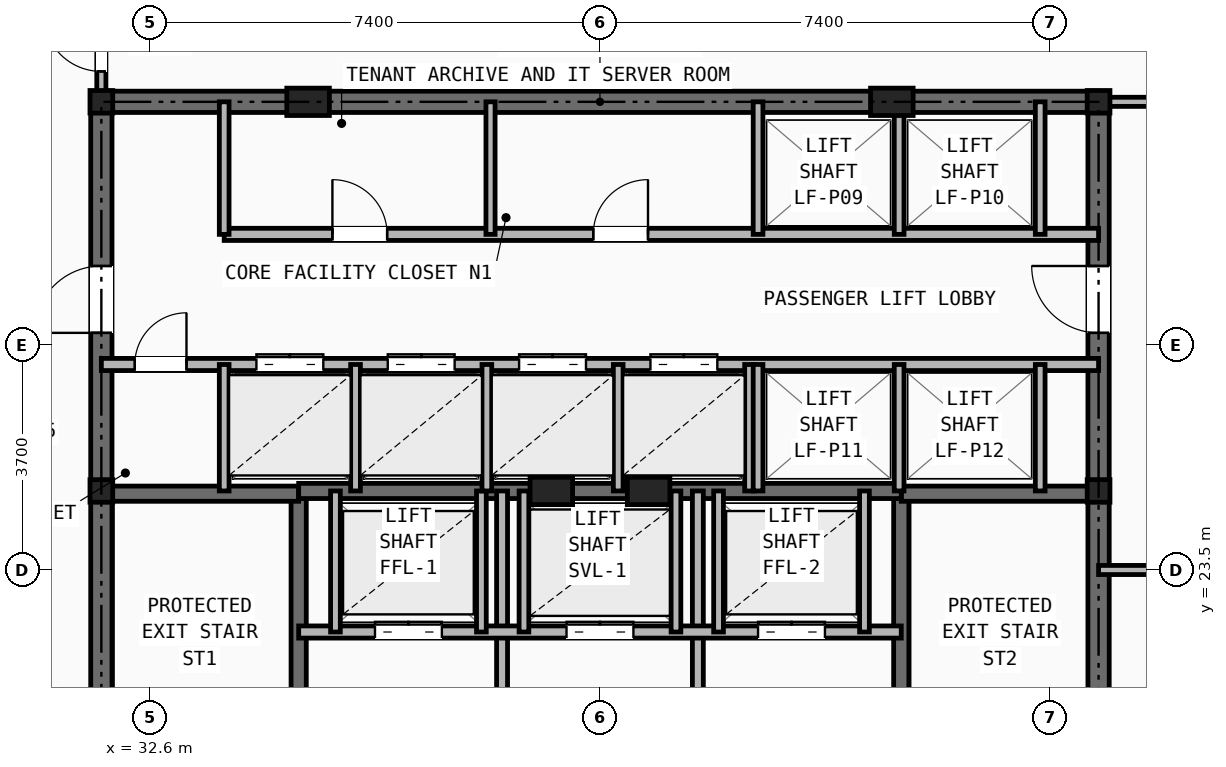
"""IFC4 building model, lengths in metres.
Left out: names, types, materials, properties, quantities, classifications, styles, units other than length and angle.
Written with IfcOpenShell. Run it as: python <this file> out.ifc"""

import sys

from ifc_helpers import new_model, si_unit, direction, frame, frame_2d, origin, origin_2d, place, context, subcontext, project, spatial, rectangle, i_section, extrude, element, fill, save


model = new_model("IFC4")
c1 = context("Model", 3, precision=1e-05, world=origin(), true_north=direction((0.0, 1.0)))
c2 = subcontext(c1, "Body", "Model", "MODEL_VIEW")
j1 = project(units=[si_unit("LENGTHUNIT", "METRE"), si_unit("PLANEANGLEUNIT", "RADIAN")], contexts=[c1])
p1 = place(None, origin())
s1 = spatial("IfcSite", under=j1, at=p1, CompositionType="ELEMENT")
p2 = place(p1, origin())
s2 = spatial("IfcBuilding", under=s1, at=p2, CompositionType="ELEMENT")
p3 = place(p2, frame((0.0, 0.0, 143.6)))
s3 = spatial("IfcBuildingStorey", under=s2, at=p3, CompositionType="ELEMENT", Elevation=143.6)
for number, where, z_axis, x_axis in (
    (1, (31.8, 24.8, 0.0), (0.0, 0.0, 1.0), (1.0, 0.0, 0.0)),
    (2, (48.2, 24.8, 0.0), (0.0, 0.0, 1.0), (1.0, 0.0, 0.0)),
    (3, (31.8, 31.2, 0.0), (0.0, 0.0, 1.0), (1.0, 0.0, 0.0)),
    (4, (48.2, 31.2, 0.0), (0.0, 0.0, 1.0), (1.0, 0.0, 0.0)),
):
    element("IfcColumn", number, at=place(p3, frame(where, z_axis=z_axis, x_axis=x_axis)), inside=s3, PredefinedType="COLUMN", context=c2, shape_type="SweptSolid", body=[
        extrude(i_section(OverallWidth=0.374, OverallDepth=0.372, WebThickness=0.016, FlangeThickness=0.026, at=origin_2d()), origin(), (0.0, 0.0, 1.0), 3.45),
    ])
for number, where, z_axis, x_axis in (
    (5, (35.2, 31.2, 0.0), (0.0, 0.0, 1.0), (1.0, 0.0, 0.0)),
    (6, (44.8, 31.2, 0.0), (0.0, 0.0, 1.0), (1.0, 0.0, 0.0)),
    (7, (39.2, 24.8, 0.0), (0.0, 0.0, 1.0), (1.0, 0.0, 0.0)),
    (8, (40.8, 24.8, 0.0), (0.0, 0.0, 1.0), (1.0, 0.0, 0.0)),
):
    element("IfcColumn", number, at=place(p3, frame(where, z_axis=z_axis, x_axis=x_axis)), inside=s3, PredefinedType="PILASTER", context=c2, shape_type="SweptSolid", body=[
        extrude(rectangle(XDim=0.7, YDim=0.45, at=origin_2d()), origin(), (0.0, 0.0, 1.0), 3.45),
    ])
p4 = place(p3, frame((31.8, 31.2, 0.0), z_axis=(0.0, 0.0, 1.0), x_axis=(1.0, 0.0, 0.0)))
e9 = element("IfcWall", 9, at=p4, inside=s3, PredefinedType="SHEAR", context=c2, shape_type="SweptSolid", body=[
    extrude(rectangle(XDim=16.4, YDim=0.35, at=frame_2d((8.2, 0.0))), origin(), (0.0, 0.0, 1.0), 3.21),
])
p5 = place(p3, frame((31.8, 16.4, 0.0), z_axis=(0.0, 0.0, 1.0), x_axis=(0.0, 1.0, 0.0)))
e10 = element("IfcWall", 10, at=p5, inside=s3, PredefinedType="SHEAR", context=c2, shape_type="SweptSolid", body=[
    extrude(rectangle(XDim=14.8, YDim=0.35, at=frame_2d((7.4, 0.0))), origin(), (0.0, 0.0, 1.0), 3.21),
])
p6 = place(p5, frame((11.0, 0.0, 0.0)))
e11 = element("IfcOpeningElement", 11, at=p6, cuts=e10, PredefinedType="OPENING", context=c2, shape_type="SweptSolid", body=[
    extrude(rectangle(XDim=1.1, YDim=2.15, at=frame_2d((0.55, 1.075))), frame((0.0, 0.185, 0.0), z_axis=(0.0, -1.0, 0.0), x_axis=(1.0, 0.0, 0.0)), (0.0, 0.0, 1.0), 0.37),
])
p7 = place(p3, frame((48.2, 16.4, 0.0), z_axis=(0.0, 0.0, 1.0), x_axis=(0.0, 1.0, 0.0)))
e12 = element("IfcWall", 12, at=p7, inside=s3, PredefinedType="SHEAR", context=c2, shape_type="SweptSolid", body=[
    extrude(rectangle(XDim=14.8, YDim=0.35, at=frame_2d((7.4, 0.0))), origin(), (0.0, 0.0, 1.0), 3.21),
])
p8 = place(p7, frame((11.0, 0.0, 0.0)))
e13 = element("IfcOpeningElement", 13, at=p8, cuts=e12, PredefinedType="OPENING", context=c2, shape_type="SweptSolid", body=[
    extrude(rectangle(XDim=1.1, YDim=2.15, at=frame_2d((0.55, 1.075))), frame((0.0, 0.185, 0.0), z_axis=(0.0, -1.0, 0.0), x_axis=(1.0, 0.0, 0.0)), (0.0, 0.0, 1.0), 0.37),
])
p9 = place(p3, frame((35.045, 16.4, 0.0), z_axis=(0.0, 0.0, 1.0), x_axis=(0.0, 1.0, 0.0)))
e14 = element("IfcWall", 14, at=p9, inside=s3, PredefinedType="SHEAR", context=c2, shape_type="SweptSolid", body=[
    extrude(rectangle(XDim=8.4, YDim=0.25, at=frame_2d((4.2, 0.0))), origin(), (0.0, 0.0, 1.0), 3.21),
])
p10 = place(p9, frame((0.45, 0.0, 0.0)))
e15 = element("IfcOpeningElement", 15, at=p10, cuts=e14, PredefinedType="OPENING", context=c2, shape_type="SweptSolid", body=[
    extrude(rectangle(XDim=0.95, YDim=2.1, at=frame_2d((0.475, 1.05))), frame((0.0, 0.135, 0.0), z_axis=(0.0, -1.0, 0.0), x_axis=(1.0, 0.0, 0.0)), (0.0, 0.0, 1.0), 0.27),
])
p11 = place(p3, frame((31.8, 24.755, 0.0), z_axis=(0.0, 0.0, 1.0), x_axis=(1.0, 0.0, 0.0)))
e16 = element("IfcWall", 16, at=p11, inside=s3, PredefinedType="SHEAR", context=c2, shape_type="SweptSolid", body=[
    extrude(rectangle(XDim=3.245, YDim=0.25, at=frame_2d((1.623, 0.0))), origin(), (0.0, 0.0, 1.0), 3.21),
])
p12 = place(p3, frame((44.955, 16.4, 0.0), z_axis=(0.0, 0.0, 1.0), x_axis=(0.0, 1.0, 0.0)))
e17 = element("IfcWall", 17, at=p12, inside=s3, PredefinedType="SHEAR", context=c2, shape_type="SweptSolid", body=[
    extrude(rectangle(XDim=8.4, YDim=0.25, at=frame_2d((4.2, 0.0))), origin(), (0.0, 0.0, 1.0), 3.21),
])
p13 = place(p12, frame((0.45, 0.0, 0.0)))
e18 = element("IfcOpeningElement", 18, at=p13, cuts=e17, PredefinedType="OPENING", context=c2, shape_type="SweptSolid", body=[
    extrude(rectangle(XDim=0.95, YDim=2.1, at=frame_2d((0.475, 1.05))), frame((0.0, 0.135, 0.0), z_axis=(0.0, -1.0, 0.0), x_axis=(1.0, 0.0, 0.0)), (0.0, 0.0, 1.0), 0.27),
])
p14 = place(p3, frame((44.955, 24.755, 0.0), z_axis=(0.0, 0.0, 1.0), x_axis=(1.0, 0.0, 0.0)))
e19 = element("IfcWall", 19, at=p14, inside=s3, PredefinedType="SHEAR", context=c2, shape_type="SweptSolid", body=[
    extrude(rectangle(XDim=3.245, YDim=0.25, at=frame_2d((1.623, 0.0))), origin(), (0.0, 0.0, 1.0), 3.21),
])
p15 = place(p3, frame((35.045, 24.8, 0.0), z_axis=(0.0, 0.0, 1.0), x_axis=(1.0, 0.0, 0.0)))
e20 = element("IfcWall", 20, at=p15, inside=s3, PredefinedType="SHEAR", context=c2, shape_type="SweptSolid", body=[
    extrude(rectangle(XDim=9.91, YDim=0.25, at=frame_2d((4.955, 0.0))), origin(), (0.0, 0.0, 1.0), 3.21),
])
p16 = place(p3, frame((38.39, 16.4, 0.0), z_axis=(0.0, 0.0, 1.0), x_axis=(0.0, 1.0, 0.0)))
e21 = element("IfcWall", 21, at=p16, inside=s3, PredefinedType="PARTITIONING", context=c2, shape_type="SweptSolid", body=[
    extrude(rectangle(XDim=8.4, YDim=0.18, at=frame_2d((4.2, 0.0))), origin(), (0.0, 0.0, 1.0), 2.661),
])
p17 = place(p16, frame((3.85, 0.0, 0.0)))
e22 = element("IfcOpeningElement", 22, at=p17, cuts=e21, PredefinedType="OPENING", context=c2, shape_type="SweptSolid", body=[
    extrude(rectangle(XDim=0.95, YDim=2.1, at=frame_2d((0.475, 1.05))), frame((0.0, 0.1, 0.0), z_axis=(0.0, -1.0, 0.0), x_axis=(1.0, 0.0, 0.0)), (0.0, 0.0, 1.0), 0.2),
])
p18 = place(p3, frame((41.61, 16.4, 0.0), z_axis=(0.0, 0.0, 1.0), x_axis=(0.0, 1.0, 0.0)))
e23 = element("IfcWall", 23, at=p18, inside=s3, PredefinedType="PARTITIONING", context=c2, shape_type="SweptSolid", body=[
    extrude(rectangle(XDim=8.4, YDim=0.18, at=frame_2d((4.2, 0.0))), origin(), (0.0, 0.0, 1.0), 2.661),
])
p19 = place(p3, frame((35.045, 22.48, 0.0), z_axis=(0.0, 0.0, 1.0), x_axis=(1.0, 0.0, 0.0)))
e24 = element("IfcWall", 24, at=p19, inside=s3, PredefinedType="SOLIDWALL", context=c2, shape_type="SweptSolid", body=[
    extrude(rectangle(XDim=9.91, YDim=0.2, at=frame_2d((4.955, 0.0))), origin(), (0.0, 0.0, 1.0), 3.21),
])
p20 = place(p19, frame((1.255, 0.0, 0.0)))
e25 = element("IfcOpeningElement", 25, at=p20, cuts=e24, PredefinedType="OPENING", context=c2, shape_type="SweptSolid", body=[
    extrude(rectangle(XDim=1.1, YDim=2.15, at=frame_2d((0.55, 1.075))), frame((0.0, 0.11, 0.0), z_axis=(0.0, -1.0, 0.0), x_axis=(1.0, 0.0, 0.0)), (0.0, 0.0, 1.0), 0.22),
])
p21 = place(p19, frame((7.555, 0.0, 0.0)))
e26 = element("IfcOpeningElement", 26, at=p21, cuts=e24, PredefinedType="OPENING", context=c2, shape_type="SweptSolid", body=[
    extrude(rectangle(XDim=1.1, YDim=2.15, at=frame_2d((0.55, 1.075))), frame((0.0, 0.11, 0.0), z_axis=(0.0, -1.0, 0.0), x_axis=(1.0, 0.0, 0.0)), (0.0, 0.0, 1.0), 0.22),
])
p22 = place(p19, frame((4.405, 0.0, 0.0)))
e27 = element("IfcOpeningElement", 27, at=p22, cuts=e24, PredefinedType="OPENING", context=c2, shape_type="SweptSolid", body=[
    extrude(rectangle(XDim=1.1, YDim=2.15, at=frame_2d((0.55, 1.075))), frame((0.0, 0.11, 0.0), z_axis=(0.0, -1.0, 0.0), x_axis=(1.0, 0.0, 0.0)), (0.0, 0.0, 1.0), 0.22),
])
for number, where, z_axis, x_axis in (
    (28, (35.65, 22.48, 0.0), (0.0, 0.0, 1.0), (0.0, 1.0, 0.0)),
    (29, (38.05, 22.48, 0.0), (0.0, 0.0, 1.0), (0.0, 1.0, 0.0)),
    (30, (41.95, 22.48, 0.0), (0.0, 0.0, 1.0), (0.0, 1.0, 0.0)),
    (31, (44.35, 22.48, 0.0), (0.0, 0.0, 1.0), (0.0, 1.0, 0.0)),
    (32, (38.75, 22.48, 0.0), (0.0, 0.0, 1.0), (0.0, 1.0, 0.0)),
    (33, (41.25, 22.48, 0.0), (0.0, 0.0, 1.0), (0.0, 1.0, 0.0)),
):
    element("IfcWall", number, at=place(p3, frame(where, z_axis=z_axis, x_axis=x_axis)), inside=s3, PredefinedType="SOLIDWALL", context=c2, shape_type="SweptSolid", body=[
        extrude(rectangle(XDim=2.32, YDim=0.16, at=frame_2d((1.16, 0.0))), origin(), (0.0, 0.0, 1.0), 3.21),
    ])
p23 = place(p3, frame((33.82, 29.02, 0.0), z_axis=(0.0, 0.0, 1.0), x_axis=(1.0, 0.0, 0.0)))
e34 = element("IfcWall", 34, at=p23, inside=s3, PredefinedType="SOLIDWALL", context=c2, shape_type="SweptSolid", body=[
    extrude(rectangle(XDim=14.38, YDim=0.2, at=frame_2d((7.19, 0.0))), origin(), (0.0, 0.0, 1.0), 2.661),
])
p24 = place(p23, frame((1.78, 0.0, 0.0)))
e35 = element("IfcOpeningElement", 35, at=p24, cuts=e34, PredefinedType="OPENING", context=c2, shape_type="SweptSolid", body=[
    extrude(rectangle(XDim=0.9, YDim=2.1, at=frame_2d((0.45, 1.05))), frame((0.0, 0.11, 0.0), z_axis=(0.0, -1.0, 0.0), x_axis=(1.0, 0.0, 0.0)), (0.0, 0.0, 1.0), 0.22),
])
p25 = place(p23, frame((6.07, 0.0, 0.0)))
e36 = element("IfcOpeningElement", 36, at=p25, cuts=e34, PredefinedType="OPENING", context=c2, shape_type="SweptSolid", body=[
    extrude(rectangle(XDim=0.9, YDim=2.1, at=frame_2d((0.45, 1.05))), frame((0.0, 0.11, 0.0), z_axis=(0.0, -1.0, 0.0), x_axis=(1.0, 0.0, 0.0)), (0.0, 0.0, 1.0), 0.22),
])
p26 = place(p3, frame((31.8, 26.88, 0.0), z_axis=(0.0, 0.0, 1.0), x_axis=(1.0, 0.0, 0.0)))
e37 = element("IfcWall", 37, at=p26, inside=s3, PredefinedType="SOLIDWALL", context=c2, shape_type="SweptSolid", body=[
    extrude(rectangle(XDim=16.4, YDim=0.2, at=frame_2d((8.2, 0.0))), origin(), (0.0, 0.0, 1.0), 2.661),
])
p27 = place(p26, frame((0.55, 0.0, 0.0)))
e38 = element("IfcOpeningElement", 38, at=p27, cuts=e37, PredefinedType="OPENING", context=c2, shape_type="SweptSolid", body=[
    extrude(rectangle(XDim=0.85, YDim=2.05, at=frame_2d((0.425, 1.025))), frame((0.0, 0.11, 0.0), z_axis=(0.0, -1.0, 0.0), x_axis=(1.0, 0.0, 0.0)), (0.0, 0.0, 1.0), 0.22),
])
p28 = place(p26, frame((2.55, 0.0, 0.0)))
e39 = element("IfcOpeningElement", 39, at=p28, cuts=e37, PredefinedType="OPENING", context=c2, shape_type="SweptSolid", body=[
    extrude(rectangle(XDim=1.1, YDim=2.15, at=frame_2d((0.55, 1.075))), frame((0.0, 0.11, 0.0), z_axis=(0.0, -1.0, 0.0), x_axis=(1.0, 0.0, 0.0)), (0.0, 0.0, 1.0), 0.22),
])
p29 = place(p26, frame((4.71, 0.0, 0.0)))
e40 = element("IfcOpeningElement", 40, at=p29, cuts=e37, PredefinedType="OPENING", context=c2, shape_type="SweptSolid", body=[
    extrude(rectangle(XDim=1.1, YDim=2.15, at=frame_2d((0.55, 1.075))), frame((0.0, 0.11, 0.0), z_axis=(0.0, -1.0, 0.0), x_axis=(1.0, 0.0, 0.0)), (0.0, 0.0, 1.0), 0.22),
])
p30 = place(p26, frame((6.87, 0.0, 0.0)))
e41 = element("IfcOpeningElement", 41, at=p30, cuts=e37, PredefinedType="OPENING", context=c2, shape_type="SweptSolid", body=[
    extrude(rectangle(XDim=1.1, YDim=2.15, at=frame_2d((0.55, 1.075))), frame((0.0, 0.11, 0.0), z_axis=(0.0, -1.0, 0.0), x_axis=(1.0, 0.0, 0.0)), (0.0, 0.0, 1.0), 0.22),
])
p31 = place(p26, frame((9.03, 0.0, 0.0)))
e42 = element("IfcOpeningElement", 42, at=p31, cuts=e37, PredefinedType="OPENING", context=c2, shape_type="SweptSolid", body=[
    extrude(rectangle(XDim=1.1, YDim=2.15, at=frame_2d((0.55, 1.075))), frame((0.0, 0.11, 0.0), z_axis=(0.0, -1.0, 0.0), x_axis=(1.0, 0.0, 0.0)), (0.0, 0.0, 1.0), 0.22),
])
p32 = place(p3, frame((33.82, 29.02, 0.0), z_axis=(0.0, 0.0, 1.0), x_axis=(0.0, 1.0, 0.0)))
e43 = element("IfcWall", 43, at=p32, inside=s3, PredefinedType="SOLIDWALL", context=c2, shape_type="SweptSolid", body=[
    extrude(rectangle(XDim=2.18, YDim=0.16, at=frame_2d((1.09, 0.0))), origin(), (0.0, 0.0, 1.0), 2.661),
])
p33 = place(p3, frame((33.82, 24.8, 0.0), z_axis=(0.0, 0.0, 1.0), x_axis=(0.0, 1.0, 0.0)))
e44 = element("IfcWall", 44, at=p33, inside=s3, PredefinedType="SOLIDWALL", context=c2, shape_type="SweptSolid", body=[
    extrude(rectangle(XDim=2.08, YDim=0.16, at=frame_2d((1.04, 0.0))), origin(), (0.0, 0.0, 1.0), 3.21),
])
p34 = place(p3, frame((38.2, 29.02, 0.0), z_axis=(0.0, 0.0, 1.0), x_axis=(0.0, 1.0, 0.0)))
e45 = element("IfcWall", 45, at=p34, inside=s3, PredefinedType="PARTITIONING", context=c2, shape_type="SweptSolid", body=[
    extrude(rectangle(XDim=2.18, YDim=0.15, at=frame_2d((1.09, 0.0))), origin(), (0.0, 0.0, 1.0), 2.661),
])
for number, where, z_axis, x_axis in (
    (46, (35.98, 24.8, 0.0), (0.0, 0.0, 1.0), (0.0, 1.0, 0.0)),
    (47, (38.14, 24.8, 0.0), (0.0, 0.0, 1.0), (0.0, 1.0, 0.0)),
    (48, (40.3, 24.8, 0.0), (0.0, 0.0, 1.0), (0.0, 1.0, 0.0)),
    (49, (42.46, 24.8, 0.0), (0.0, 0.0, 1.0), (0.0, 1.0, 0.0)),
):
    element("IfcWall", number, at=place(p3, frame(where, z_axis=z_axis, x_axis=x_axis)), inside=s3, PredefinedType="SOLIDWALL", context=c2, shape_type="SweptSolid", body=[
        extrude(rectangle(XDim=2.08, YDim=0.16, at=frame_2d((1.04, 0.0))), origin(), (0.0, 0.0, 1.0), 3.21),
    ])
for number, where, z_axis, x_axis in (
    (50, (42.6, 29.02, 0.0), (0.0, 0.0, 1.0), (0.0, 1.0, 0.0)),
    (51, (44.92, 29.02, 0.0), (0.0, 0.0, 1.0), (0.0, 1.0, 0.0)),
    (52, (47.24, 29.02, 0.0), (0.0, 0.0, 1.0), (0.0, 1.0, 0.0)),
):
    element("IfcWall", number, at=place(p3, frame(where, z_axis=z_axis, x_axis=x_axis)), inside=s3, PredefinedType="SOLIDWALL", context=c2, shape_type="SweptSolid", body=[
        extrude(rectangle(XDim=2.18, YDim=0.16, at=frame_2d((1.09, 0.0))), origin(), (0.0, 0.0, 1.0), 2.661),
    ])
for number, where, z_axis, x_axis in (
    (53, (42.6, 24.8, 0.0), (0.0, 0.0, 1.0), (0.0, 1.0, 0.0)),
    (54, (44.92, 24.8, 0.0), (0.0, 0.0, 1.0), (0.0, 1.0, 0.0)),
    (55, (47.24, 24.8, 0.0), (0.0, 0.0, 1.0), (0.0, 1.0, 0.0)),
):
    element("IfcWall", number, at=place(p3, frame(where, z_axis=z_axis, x_axis=x_axis)), inside=s3, PredefinedType="SOLIDWALL", context=c2, shape_type="SweptSolid", body=[
        extrude(rectangle(XDim=2.08, YDim=0.16, at=frame_2d((1.04, 0.0))), origin(), (0.0, 0.0, 1.0), 3.21),
    ])
p35 = place(p3, frame((31.8, 31.2, 0.0), z_axis=(0.0, 0.0, 1.0), x_axis=(0.0, 1.0, 0.0)))
e56 = element("IfcWall", 56, at=p35, inside=s3, PredefinedType="PARTITIONING", context=c2, shape_type="SweptSolid", body=[
    extrude(rectangle(XDim=5.3, YDim=0.15, at=frame_2d((2.65, 0.0))), origin(), (0.0, 0.0, 1.0), 2.252),
])
p36 = place(p35, frame((0.5, 0.0, 0.0)))
e57 = element("IfcOpeningElement", 57, at=p36, cuts=e56, PredefinedType="OPENING", context=c2, shape_type="SweptSolid", body=[
    extrude(rectangle(XDim=0.95, YDim=2.1, at=frame_2d((0.475, 1.05))), frame((0.0, 0.085, 0.0), z_axis=(0.0, -1.0, 0.0), x_axis=(1.0, 0.0, 0.0)), (0.0, 0.0, 1.0), 0.17),
])
p37 = place(p3, frame((48.2, 31.2, 0.0), z_axis=(0.0, 0.0, 1.0), x_axis=(1.0, 0.0, 0.0)))
e58 = element("IfcWall", 58, at=p37, inside=s3, PredefinedType="PARTITIONING", context=c2, shape_type="SweptSolid", body=[
    extrude(rectangle(XDim=8.332, YDim=0.15, at=frame_2d((4.166, 0.0))), origin(), (0.0, 0.0, 1.0), 2.252),
])
p38 = place(p3, frame((48.2, 23.5, 0.0), z_axis=(0.0, 0.0, 1.0), x_axis=(1.0, 0.0, 0.0)))
e59 = element("IfcWall", 59, at=p38, inside=s3, PredefinedType="PARTITIONING", context=c2, shape_type="SweptSolid", body=[
    extrude(rectangle(XDim=12.933, YDim=0.15, at=frame_2d((6.467, 0.0))), origin(), (0.0, 0.0, 1.0), 2.589),
])
p39 = place(p38, frame((1.4, 0.0, 0.0)))
e60 = element("IfcOpeningElement", 60, at=p39, cuts=e59, PredefinedType="OPENING", context=c2, shape_type="SweptSolid", body=[
    extrude(rectangle(XDim=0.95, YDim=2.1, at=frame_2d((0.475, 1.05))), frame((0.0, 0.085, 0.0), z_axis=(0.0, -1.0, 0.0), x_axis=(1.0, 0.0, 0.0)), (0.0, 0.0, 1.0), 0.17),
])
p40 = place(p20, origin())
e61 = element("IfcDoor", 61, at=p40, inside=s3, OperationType="DOUBLE_DOOR_SLIDING", PredefinedType="DOOR", context=c2, shape_type="SweptSolid", body=[
    extrude(rectangle(XDim=1.1, YDim=2.15, at=frame_2d((0.55, 1.075))), frame((0.0, 0.025, 0.0), z_axis=(0.0, -1.0, 0.0), x_axis=(1.0, 0.0, 0.0)), (0.0, 0.0, 1.0), 0.05),
])
fill(e25, e61)
p41 = place(p21, origin())
e62 = element("IfcDoor", 62, at=p41, inside=s3, OperationType="DOUBLE_DOOR_SLIDING", PredefinedType="DOOR", context=c2, shape_type="SweptSolid", body=[
    extrude(rectangle(XDim=1.1, YDim=2.15, at=frame_2d((0.55, 1.075))), frame((0.0, 0.025, 0.0), z_axis=(0.0, -1.0, 0.0), x_axis=(1.0, 0.0, 0.0)), (0.0, 0.0, 1.0), 0.05),
])
fill(e26, e62)
p42 = place(p22, origin())
e63 = element("IfcDoor", 63, at=p42, inside=s3, OperationType="DOUBLE_DOOR_SLIDING", PredefinedType="DOOR", context=c2, shape_type="SweptSolid", body=[
    extrude(rectangle(XDim=1.1, YDim=2.15, at=frame_2d((0.55, 1.075))), frame((0.0, 0.025, 0.0), z_axis=(0.0, -1.0, 0.0), x_axis=(1.0, 0.0, 0.0)), (0.0, 0.0, 1.0), 0.05),
])
fill(e27, e63)
p43 = place(p27, origin())
e64 = element("IfcDoor", 64, at=p43, inside=s3, OperationType="SINGLE_SWING_RIGHT", PredefinedType="DOOR", context=c2, shape_type="SweptSolid", body=[
    extrude(rectangle(XDim=0.85, YDim=2.05, at=frame_2d((0.425, 1.025))), frame((0.0, 0.025, 0.0), z_axis=(0.0, -1.0, 0.0), x_axis=(1.0, 0.0, 0.0)), (0.0, 0.0, 1.0), 0.05),
])
fill(e38, e64)
p44 = place(p6, origin())
e65 = element("IfcDoor", 65, at=p44, inside=s3, OperationType="SINGLE_SWING_LEFT", PredefinedType="DOOR", context=c2, shape_type="SweptSolid", body=[
    extrude(rectangle(XDim=1.1, YDim=2.15, at=frame_2d((0.55, 1.075))), frame((0.0, 0.025, 0.0), z_axis=(0.0, -1.0, 0.0), x_axis=(1.0, 0.0, 0.0)), (0.0, 0.0, 1.0), 0.05),
])
fill(e11, e65)
p45 = place(p8, origin())
e66 = element("IfcDoor", 66, at=p45, inside=s3, OperationType="SINGLE_SWING_RIGHT", PredefinedType="DOOR", context=c2, shape_type="SweptSolid", body=[
    extrude(rectangle(XDim=1.1, YDim=2.15, at=frame_2d((0.55, 1.075))), frame((0.0, 0.025, 0.0), z_axis=(0.0, -1.0, 0.0), x_axis=(1.0, 0.0, 0.0)), (0.0, 0.0, 1.0), 0.05),
])
fill(e13, e66)
p46 = place(p24, origin())
e67 = element("IfcDoor", 67, at=p46, inside=s3, OperationType="SINGLE_SWING_LEFT", PredefinedType="DOOR", context=c2, shape_type="SweptSolid", body=[
    extrude(rectangle(XDim=0.9, YDim=2.1, at=frame_2d((0.45, 1.05))), frame((0.0, 0.025, 0.0), z_axis=(0.0, -1.0, 0.0), x_axis=(1.0, 0.0, 0.0)), (0.0, 0.0, 1.0), 0.05),
])
fill(e35, e67)
p47 = place(p25, origin())
e68 = element("IfcDoor", 68, at=p47, inside=s3, OperationType="SINGLE_SWING_RIGHT", PredefinedType="DOOR", context=c2, shape_type="SweptSolid", body=[
    extrude(rectangle(XDim=0.9, YDim=2.1, at=frame_2d((0.45, 1.05))), frame((0.0, 0.025, 0.0), z_axis=(0.0, -1.0, 0.0), x_axis=(1.0, 0.0, 0.0)), (0.0, 0.0, 1.0), 0.05),
])
fill(e36, e68)
p48 = place(p28, origin())
e69 = element("IfcDoor", 69, at=p48, inside=s3, OperationType="DOUBLE_DOOR_SLIDING", PredefinedType="DOOR", context=c2, shape_type="SweptSolid", body=[
    extrude(rectangle(XDim=1.1, YDim=2.15, at=frame_2d((0.55, 1.075))), frame((0.0, 0.025, 0.0), z_axis=(0.0, -1.0, 0.0), x_axis=(1.0, 0.0, 0.0)), (0.0, 0.0, 1.0), 0.05),
])
fill(e39, e69)
p49 = place(p29, origin())
e70 = element("IfcDoor", 70, at=p49, inside=s3, OperationType="DOUBLE_DOOR_SLIDING", PredefinedType="DOOR", context=c2, shape_type="SweptSolid", body=[
    extrude(rectangle(XDim=1.1, YDim=2.15, at=frame_2d((0.55, 1.075))), frame((0.0, 0.025, 0.0), z_axis=(0.0, -1.0, 0.0), x_axis=(1.0, 0.0, 0.0)), (0.0, 0.0, 1.0), 0.05),
])
fill(e40, e70)
p50 = place(p30, origin())
e71 = element("IfcDoor", 71, at=p50, inside=s3, OperationType="DOUBLE_DOOR_SLIDING", PredefinedType="DOOR", context=c2, shape_type="SweptSolid", body=[
    extrude(rectangle(XDim=1.1, YDim=2.15, at=frame_2d((0.55, 1.075))), frame((0.0, 0.025, 0.0), z_axis=(0.0, -1.0, 0.0), x_axis=(1.0, 0.0, 0.0)), (0.0, 0.0, 1.0), 0.05),
])
fill(e41, e71)
p51 = place(p31, origin())
e72 = element("IfcDoor", 72, at=p51, inside=s3, OperationType="DOUBLE_DOOR_SLIDING", PredefinedType="DOOR", context=c2, shape_type="SweptSolid", body=[
    extrude(rectangle(XDim=1.1, YDim=2.15, at=frame_2d((0.55, 1.075))), frame((0.0, 0.025, 0.0), z_axis=(0.0, -1.0, 0.0), x_axis=(1.0, 0.0, 0.0)), (0.0, 0.0, 1.0), 0.05),
])
fill(e42, e72)
p52 = place(p36, origin())
e73 = element("IfcDoor", 73, at=p52, inside=s3, OperationType="SINGLE_SWING_RIGHT", PredefinedType="DOOR", context=c2, shape_type="SweptSolid", body=[
    extrude(rectangle(XDim=0.95, YDim=2.1, at=frame_2d((0.475, 1.05))), frame((0.0, 0.025, 0.0), z_axis=(0.0, -1.0, 0.0), x_axis=(1.0, 0.0, 0.0)), (0.0, 0.0, 1.0), 0.05),
])
fill(e57, e73)
save(model, sys.argv[1])
